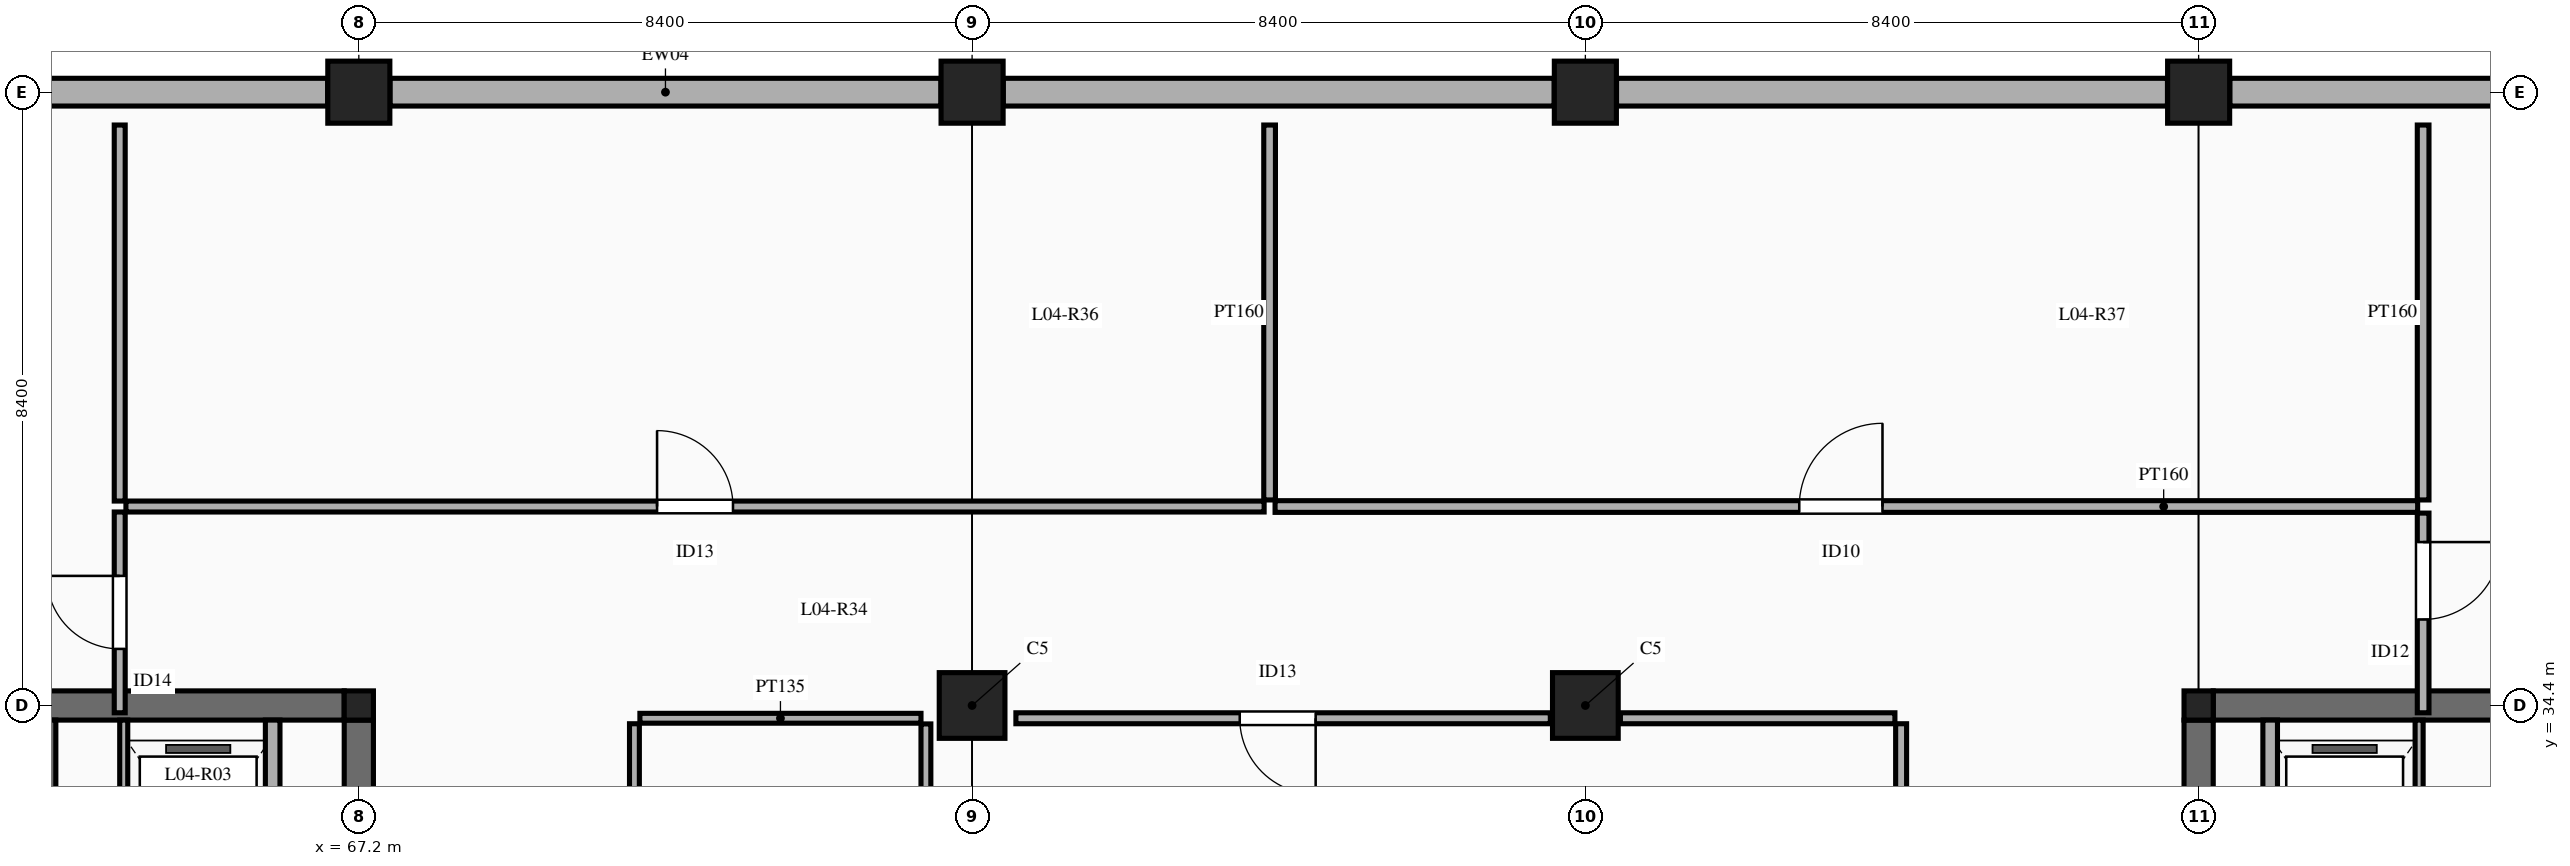
"""IFC4 building model, lengths in metres.
Left out: names, types, materials, properties, quantities, classifications, styles, units other than length and angle.
Written with IfcOpenShell. Run it as: python <this file> out.ifc"""

import sys

from ifc_helpers import new_model, si_unit, direction, frame, frame_2d, origin, origin_2d, place, context, subcontext, project, spatial, rectangle, extrude, element, fill, save


model = new_model("IFC4")
c1 = context("Model", 3, precision=1e-05, world=origin(), true_north=direction((0.0, 1.0)))
c2 = subcontext(c1, "Body", "Model", "MODEL_VIEW")
j1 = project(units=[si_unit("LENGTHUNIT", "METRE"), si_unit("PLANEANGLEUNIT", "RADIAN")], contexts=[c1])
p1 = place(None, origin())
s1 = spatial("IfcSite", under=j1, at=p1, CompositionType="ELEMENT")
p2 = place(p1, origin())
s2 = spatial("IfcBuilding", under=s1, at=p2, CompositionType="ELEMENT")
p3 = place(p2, frame((0.0, 0.0, 19.5)))
s3 = spatial("IfcBuildingStorey", under=s2, at=p3, CompositionType="ELEMENT", Elevation=19.5)
p4 = place(p3, frame((67.2, 34.4, 0.0), z_axis=(0.0, 0.0, 1.0), x_axis=(1.0, 0.0, 0.0)))
e1 = element("IfcColumn", 1, at=p4, inside=s3, PredefinedType="COLUMN", context=c2, shape_type="SweptSolid", body=[
    extrude(rectangle(XDim=0.4, YDim=0.4, at=origin_2d()), origin(), (0.0, 0.0, 1.0), 4.5),
])
p5 = place(p3, frame((67.2, 42.8, 0.0), z_axis=(0.0, 0.0, 1.0), x_axis=(1.0, 0.0, 0.0)))
e2 = element("IfcColumn", 2, at=p5, inside=s3, PredefinedType="COLUMN", context=c2, shape_type="SweptSolid", body=[
    extrude(rectangle(XDim=0.85, YDim=0.85, at=origin_2d()), origin(), (0.0, 0.0, 1.0), 4.5),
])
p6 = place(p3, frame((75.6, 34.4, 0.0), z_axis=(0.0, 0.0, 1.0), x_axis=(1.0, 0.0, 0.0)))
e3 = element("IfcColumn", 3, at=p6, inside=s3, PredefinedType="COLUMN", context=c2, shape_type="SweptSolid", body=[
    extrude(rectangle(XDim=0.9, YDim=0.9, at=origin_2d()), origin(), (0.0, 0.0, 1.0), 4.5),
])
p7 = place(p3, frame((75.6, 42.8, 0.0), z_axis=(0.0, 0.0, 1.0), x_axis=(1.0, 0.0, 0.0)))
e4 = element("IfcColumn", 4, at=p7, inside=s3, PredefinedType="COLUMN", context=c2, shape_type="SweptSolid", body=[
    extrude(rectangle(XDim=0.85, YDim=0.85, at=origin_2d()), origin(), (0.0, 0.0, 1.0), 4.5),
])
p8 = place(p3, frame((84.0, 34.4, 0.0), z_axis=(0.0, 0.0, 1.0), x_axis=(1.0, 0.0, 0.0)))
e5 = element("IfcColumn", 5, at=p8, inside=s3, PredefinedType="COLUMN", context=c2, shape_type="SweptSolid", body=[
    extrude(rectangle(XDim=0.9, YDim=0.9, at=origin_2d()), origin(), (0.0, 0.0, 1.0), 4.5),
])
p9 = place(p3, frame((84.0, 42.8, 0.0), z_axis=(0.0, 0.0, 1.0), x_axis=(1.0, 0.0, 0.0)))
e6 = element("IfcColumn", 6, at=p9, inside=s3, PredefinedType="COLUMN", context=c2, shape_type="SweptSolid", body=[
    extrude(rectangle(XDim=0.85, YDim=0.85, at=origin_2d()), origin(), (0.0, 0.0, 1.0), 4.5),
])
p10 = place(p3, frame((92.4, 34.4, 0.0), z_axis=(0.0, 0.0, 1.0), x_axis=(1.0, 0.0, 0.0)))
e7 = element("IfcColumn", 7, at=p10, inside=s3, PredefinedType="COLUMN", context=c2, shape_type="SweptSolid", body=[
    extrude(rectangle(XDim=0.4, YDim=0.4, at=origin_2d()), origin(), (0.0, 0.0, 1.0), 4.5),
])
p11 = place(p3, frame((92.4, 42.8, 0.0), z_axis=(0.0, 0.0, 1.0), x_axis=(1.0, 0.0, 0.0)))
e8 = element("IfcColumn", 8, at=p11, inside=s3, PredefinedType="COLUMN", context=c2, shape_type="SweptSolid", body=[
    extrude(rectangle(XDim=0.85, YDim=0.85, at=origin_2d()), origin(), (0.0, 0.0, 1.0), 4.5),
])
for number, where, z_axis, x_axis in (
    (9, (67.2, 26.2, 0.0), (0.0, 0.0, 1.0), (0.0, 1.0, 0.0)),
    (10, (59.0, 34.4, 0.0), (0.0, 0.0, 1.0), (1.0, 0.0, 0.0)),
    (11, (92.4, 26.2, 0.0), (0.0, 0.0, 1.0), (0.0, 1.0, 0.0)),
    (12, (92.6, 34.4, 0.0), (0.0, 0.0, 1.0), (1.0, 0.0, 0.0)),
):
    element("IfcWall", number, at=place(p3, frame(where, z_axis=z_axis, x_axis=x_axis)), inside=s3, PredefinedType="SHEAR", context=c2, shape_type="SweptSolid", body=[
        extrude(rectangle(XDim=8.0, YDim=0.4, at=frame_2d((4.0, 0.0))), origin(), (0.0, 0.0, 1.0), 4.5),
    ])
p12 = place(p3, frame((59.227, 42.8, 0.0), z_axis=(0.0, 0.0, 1.0), x_axis=(1.0, 0.0, 0.0)))
e13 = element("IfcWall", 13, at=p12, inside=s3, PredefinedType="SOLIDWALL", context=c2, shape_type="SweptSolid", body=[
    extrude(rectangle(XDim=7.546, YDim=0.38, at=frame_2d((3.773, 0.0))), origin(), (0.0, 0.0, 1.0), 3.55),
])
p13 = place(p3, frame((67.627, 42.8, 0.0), z_axis=(0.0, 0.0, 1.0), x_axis=(1.0, 0.0, 0.0)))
e14 = element("IfcWall", 14, at=p13, inside=s3, PredefinedType="SOLIDWALL", context=c2, shape_type="SweptSolid", body=[
    extrude(rectangle(XDim=7.546, YDim=0.38, at=frame_2d((3.773, 0.0))), origin(), (0.0, 0.0, 1.0), 3.55),
])
for number, where, z_axis, x_axis in (
    (15, (76.027, 42.8, 0.0), (0.0, 0.0, 1.0), (1.0, 0.0, 0.0)),
    (16, (84.427, 42.8, 0.0), (0.0, 0.0, 1.0), (1.0, 0.0, 0.0)),
):
    element("IfcWall", number, at=place(p3, frame(where, z_axis=z_axis, x_axis=x_axis)), inside=s3, PredefinedType="SOLIDWALL", context=c2, shape_type="SweptSolid", body=[
        extrude(rectangle(XDim=7.546, YDim=0.38, at=frame_2d((3.773, 0.0))), origin(), (0.0, 0.0, 1.0), 3.55),
    ])
p14 = place(p3, frame((92.827, 42.8, 0.0), z_axis=(0.0, 0.0, 1.0), x_axis=(1.0, 0.0, 0.0)))
e17 = element("IfcWall", 17, at=p14, inside=s3, PredefinedType="SOLIDWALL", context=c2, shape_type="SweptSolid", body=[
    extrude(rectangle(XDim=7.546, YDim=0.38, at=frame_2d((3.773, 0.0))), origin(), (0.0, 0.0, 1.0), 3.55),
])
p15 = place(p3, frame((62.95, 26.1, 0.0), z_axis=(0.0, 0.0, 1.0), x_axis=(0.0, 1.0, 0.0)))
e18 = element("IfcWall", 18, at=p15, inside=s3, PredefinedType="SOLIDWALL", context=c2, shape_type="SweptSolid", body=[
    extrude(rectangle(XDim=8.1, YDim=0.2, at=frame_2d((4.05, 0.0))), origin(), (0.0, 0.0, 1.0), 4.25),
])
p16 = place(p15, frame((0.45, 0.0, 0.0)))
e19 = element("IfcOpeningElement", 19, at=p16, cuts=e18, PredefinedType="OPENING", context=c2, shape_type="SweptSolid", body=[
    extrude(rectangle(XDim=1.12, YDim=2.15, at=frame_2d((0.56, 1.075))), frame((0.0, 0.11, 0.0), z_axis=(0.0, -1.0, 0.0), x_axis=(1.0, 0.0, 0.0)), (0.0, 0.0, 1.0), 0.22),
])
p17 = place(p3, frame((63.98, 31.15, 0.0), z_axis=(0.0, 0.0, 1.0), x_axis=(0.0, 1.0, 0.0)))
e20 = element("IfcWall", 20, at=p17, inside=s3, PredefinedType="PARTITIONING", context=c2, shape_type="SweptSolid", body=[
    extrude(rectangle(XDim=3.05, YDim=0.11, at=frame_2d((1.525, 0.0))), origin(), (0.0, 0.0, 1.0), 4.25),
])
p18 = place(p3, frame((66.02, 31.15, 0.0), z_axis=(0.0, 0.0, 1.0), x_axis=(0.0, 1.0, 0.0)))
e21 = element("IfcWall", 21, at=p18, inside=s3, PredefinedType="SOLIDWALL", context=c2, shape_type="SweptSolid", body=[
    extrude(rectangle(XDim=3.05, YDim=0.2, at=frame_2d((1.525, 0.0))), origin(), (0.0, 0.0, 1.0), 4.25),
])
p19 = place(p3, frame((95.42, 31.15, 0.0), z_axis=(0.0, 0.0, 1.0), x_axis=(0.0, 1.0, 0.0)))
e22 = element("IfcWall", 22, at=p19, inside=s3, PredefinedType="PARTITIONING", context=c2, shape_type="SweptSolid", body=[
    extrude(rectangle(XDim=3.05, YDim=0.11, at=frame_2d((1.525, 0.0))), origin(), (0.0, 0.0, 1.0), 4.25),
])
p20 = place(p3, frame((93.38, 31.15, 0.0), z_axis=(0.0, 0.0, 1.0), x_axis=(0.0, 1.0, 0.0)))
e23 = element("IfcWall", 23, at=p20, inside=s3, PredefinedType="SOLIDWALL", context=c2, shape_type="SweptSolid", body=[
    extrude(rectangle(XDim=3.05, YDim=0.2, at=frame_2d((1.525, 0.0))), origin(), (0.0, 0.0, 1.0), 4.25),
])
p21 = place(p3, frame((70.975, 30.25, 0.0), z_axis=(0.0, 0.0, 1.0), x_axis=(0.0, 1.0, 0.0)))
e24 = element("IfcWall", 24, at=p21, inside=s3, PredefinedType="PARTITIONING", context=c2, shape_type="SweptSolid", body=[
    extrude(rectangle(XDim=3.9, YDim=0.135, at=frame_2d((1.95, 0.0))), origin(), (0.0, 0.0, 1.0), 3.45),
])
p22 = place(p21, frame((1.46, 0.0, 0.0)))
e25 = element("IfcOpeningElement", 25, at=p22, cuts=e24, PredefinedType="OPENING", context=c2, shape_type="SweptSolid", body=[
    extrude(rectangle(XDim=0.98, YDim=2.15, at=frame_2d((0.49, 1.075))), frame((0.0, 0.077, 0.0), z_axis=(0.0, -1.0, 0.0), x_axis=(1.0, 0.0, 0.0)), (0.0, 0.0, 1.0), 0.155),
])
p23 = place(p3, frame((71.05, 34.225, 0.0), z_axis=(0.0, 0.0, 1.0), x_axis=(1.0, 0.0, 0.0)))
e26 = element("IfcWall", 26, at=p23, inside=s3, PredefinedType="PARTITIONING", context=c2, shape_type="SweptSolid", body=[
    extrude(rectangle(XDim=3.85, YDim=0.135, at=frame_2d((1.925, 0.0))), origin(), (0.0, 0.0, 1.0), 3.45),
])
p24 = place(p3, frame((88.325, 29.45, 0.0), z_axis=(0.0, 0.0, 1.0), x_axis=(0.0, 1.0, 0.0)))
e27 = element("IfcWall", 27, at=p24, inside=s3, PredefinedType="PARTITIONING", context=c2, shape_type="SweptSolid", body=[
    extrude(rectangle(XDim=4.7, YDim=0.15, at=frame_2d((2.35, 0.0))), origin(), (0.0, 0.0, 1.0), 3.45),
])
p25 = place(p3, frame((76.2, 34.225, 0.0), z_axis=(0.0, 0.0, 1.0), x_axis=(1.0, 0.0, 0.0)))
e28 = element("IfcWall", 28, at=p25, inside=s3, PredefinedType="PARTITIONING", context=c2, shape_type="SweptSolid", body=[
    extrude(rectangle(XDim=7.32, YDim=0.15, at=frame_2d((3.66, 0.0))), origin(), (0.0, 0.0, 1.0), 3.45),
])
p26 = place(p25, frame((3.066, 0.0, 0.0)))
e29 = element("IfcOpeningElement", 29, at=p26, cuts=e28, PredefinedType="OPENING", context=c2, shape_type="SweptSolid", body=[
    extrude(rectangle(XDim=1.04, YDim=2.15, at=frame_2d((0.52, 1.075))), frame((0.0, 0.085, 0.0), z_axis=(0.0, -1.0, 0.0), x_axis=(1.0, 0.0, 0.0)), (0.0, 0.0, 1.0), 0.17),
])
p27 = place(p3, frame((84.48, 34.225, 0.0), z_axis=(0.0, 0.0, 1.0), x_axis=(1.0, 0.0, 0.0)))
e30 = element("IfcWall", 30, at=p27, inside=s3, PredefinedType="PARTITIONING", context=c2, shape_type="SweptSolid", body=[
    extrude(rectangle(XDim=3.76, YDim=0.15, at=frame_2d((1.88, 0.0))), origin(), (0.0, 0.0, 1.0), 3.45),
])
p28 = place(p3, frame((63.925, 34.3, 0.0), z_axis=(0.0, 0.0, 1.0), x_axis=(0.0, 1.0, 0.0)))
e31 = element("IfcWall", 31, at=p28, inside=s3, PredefinedType="PARTITIONING", context=c2, shape_type="SweptSolid", body=[
    extrude(rectangle(XDim=2.75, YDim=0.15, at=frame_2d((1.375, 0.0))), origin(), (0.0, 0.0, 1.0), 3.45),
])
p29 = place(p28, frame((0.875, 0.0, 0.0)))
e32 = element("IfcOpeningElement", 32, at=p29, cuts=e31, PredefinedType="OPENING", context=c2, shape_type="SweptSolid", body=[
    extrude(rectangle(XDim=1.0, YDim=2.15, at=frame_2d((0.5, 1.075))), frame((0.0, 0.085, 0.0), z_axis=(0.0, -1.0, 0.0), x_axis=(1.0, 0.0, 0.0)), (0.0, 0.0, 1.0), 0.17),
])
p30 = place(p3, frame((64.01, 37.125, 0.0), z_axis=(0.0, 0.0, 1.0), x_axis=(1.0, 0.0, 0.0)))
e33 = element("IfcWall", 33, at=p30, inside=s3, PredefinedType="PARTITIONING", context=c2, shape_type="SweptSolid", body=[
    extrude(rectangle(XDim=15.59, YDim=0.15, at=frame_2d((7.795, 0.0))), origin(), (0.0, 0.0, 1.0), 3.45),
])
p31 = place(p30, frame((7.275, 0.0, 0.0)))
e34 = element("IfcOpeningElement", 34, at=p31, cuts=e33, PredefinedType="OPENING", context=c2, shape_type="SweptSolid", body=[
    extrude(rectangle(XDim=1.04, YDim=2.15, at=frame_2d((0.52, 1.075))), frame((0.0, 0.085, 0.0), z_axis=(0.0, -1.0, 0.0), x_axis=(1.0, 0.0, 0.0)), (0.0, 0.0, 1.0), 0.17),
])
p32 = place(p3, frame((79.75, 37.125, 0.0), z_axis=(0.0, 0.0, 1.0), x_axis=(1.0, 0.0, 0.0)))
e35 = element("IfcWall", 35, at=p32, inside=s3, PredefinedType="PARTITIONING", context=c2, shape_type="SweptSolid", body=[
    extrude(rectangle(XDim=15.65, YDim=0.16, at=frame_2d((7.825, 0.0))), origin(), (0.0, 0.0, 1.0), 3.45),
])
p33 = place(p32, frame((7.18, 0.0, 0.0)))
e36 = element("IfcOpeningElement", 36, at=p33, cuts=e35, PredefinedType="OPENING", context=c2, shape_type="SweptSolid", body=[
    extrude(rectangle(XDim=1.14, YDim=2.22, at=frame_2d((0.57, 1.11))), frame((0.0, 0.09, 0.0), z_axis=(0.0, -1.0, 0.0), x_axis=(1.0, 0.0, 0.0)), (0.0, 0.0, 1.0), 0.18),
])
p34 = place(p3, frame((95.475, 34.3, 0.0), z_axis=(0.0, 0.0, 1.0), x_axis=(0.0, 1.0, 0.0)))
e37 = element("IfcWall", 37, at=p34, inside=s3, PredefinedType="PARTITIONING", context=c2, shape_type="SweptSolid", body=[
    extrude(rectangle(XDim=2.735, YDim=0.16, at=frame_2d((1.367, 0.0))), origin(), (0.0, 0.0, 1.0), 3.45),
])
p35 = place(p34, frame((1.278, 0.0, 0.0)))
e38 = element("IfcOpeningElement", 38, at=p35, cuts=e37, PredefinedType="OPENING", context=c2, shape_type="SweptSolid", body=[
    extrude(rectangle(XDim=1.06, YDim=2.18, at=frame_2d((0.53, 1.09))), frame((0.0, 0.09, 0.0), z_axis=(0.0, -1.0, 0.0), x_axis=(1.0, 0.0, 0.0)), (0.0, 0.0, 1.0), 0.18),
])
p36 = place(p3, frame((63.925, 37.2, 0.0), z_axis=(0.0, 0.0, 1.0), x_axis=(0.0, 1.0, 0.0)))
e39 = element("IfcWall", 39, at=p36, inside=s3, PredefinedType="PARTITIONING", context=c2, shape_type="SweptSolid", body=[
    extrude(rectangle(XDim=5.15, YDim=0.15, at=frame_2d((2.575, 0.0))), origin(), (0.0, 0.0, 1.0), 3.45),
])
for number, where, z_axis, x_axis in (
    (40, (79.675, 37.215, 0.0), (0.0, 0.0, 1.0), (0.0, 1.0, 0.0)),
    (41, (95.475, 37.215, 0.0), (0.0, 0.0, 1.0), (0.0, 1.0, 0.0)),
):
    element("IfcWall", number, at=place(p3, frame(where, z_axis=z_axis, x_axis=x_axis)), inside=s3, PredefinedType="PARTITIONING", context=c2, shape_type="SweptSolid", body=[
        extrude(rectangle(XDim=5.135, YDim=0.16, at=frame_2d((2.567, 0.0))), origin(), (0.0, 0.0, 1.0), 3.45),
    ])
p37 = place(p3, frame((74.968, 30.252, 0.0), z_axis=(0.0, 0.0, 1.0), x_axis=(0.0, 1.0, 0.0)))
e42 = element("IfcWall", 42, at=p37, inside=s3, PredefinedType="PARTITIONING", context=c2, shape_type="SweptSolid", body=[
    extrude(rectangle(XDim=3.895, YDim=0.135, at=frame_2d((1.948, 0.0))), origin(), (0.0, 0.0, 1.0), 3.45),
])
p38 = place(p26, frame((1.04, 0.0, 0.0), z_axis=(0.0, 0.0, 1.0), x_axis=(-1.0, 0.0, 0.0)))
e43 = element("IfcDoor", 43, at=p38, inside=s3, OperationType="SINGLE_SWING_LEFT", PredefinedType="DOOR", context=c2, shape_type="SweptSolid", body=[
    extrude(rectangle(XDim=1.04, YDim=2.15, at=frame_2d((0.52, 1.075))), frame((0.0, 0.025, 0.0), z_axis=(0.0, -1.0, 0.0), x_axis=(1.0, 0.0, 0.0)), (0.0, 0.0, 1.0), 0.05),
])
fill(e29, e43)
p39 = place(p29, origin())
e44 = element("IfcDoor", 44, at=p39, inside=s3, OperationType="SINGLE_SWING_RIGHT", PredefinedType="DOOR", context=c2, shape_type="SweptSolid", body=[
    extrude(rectangle(XDim=1.0, YDim=2.15, at=frame_2d((0.5, 1.075))), frame((0.0, 0.025, 0.0), z_axis=(0.0, -1.0, 0.0), x_axis=(1.0, 0.0, 0.0)), (0.0, 0.0, 1.0), 0.05),
])
fill(e32, e44)
p40 = place(p31, origin())
e45 = element("IfcDoor", 45, at=p40, inside=s3, OperationType="SINGLE_SWING_LEFT", PredefinedType="DOOR", context=c2, shape_type="SweptSolid", body=[
    extrude(rectangle(XDim=1.04, YDim=2.15, at=frame_2d((0.52, 1.075))), frame((0.0, 0.025, 0.0), z_axis=(0.0, -1.0, 0.0), x_axis=(1.0, 0.0, 0.0)), (0.0, 0.0, 1.0), 0.05),
])
fill(e34, e45)
p41 = place(p33, origin())
e46 = element("IfcDoor", 46, at=p41, inside=s3, OperationType="SINGLE_SWING_RIGHT", PredefinedType="DOOR", context=c2, shape_type="SweptSolid", body=[
    extrude(rectangle(XDim=1.14, YDim=2.22, at=frame_2d((0.57, 1.11))), frame((0.0, 0.025, 0.0), z_axis=(0.0, -1.0, 0.0), x_axis=(1.0, 0.0, 0.0)), (0.0, 0.0, 1.0), 0.05),
])
fill(e36, e46)
p42 = place(p35, frame((1.06, 0.0, 0.0), z_axis=(0.0, 0.0, 1.0), x_axis=(-1.0, 0.0, 0.0)))
e47 = element("IfcDoor", 47, at=p42, inside=s3, OperationType="SINGLE_SWING_LEFT", PredefinedType="DOOR", context=c2, shape_type="SweptSolid", body=[
    extrude(rectangle(XDim=1.06, YDim=2.18, at=frame_2d((0.53, 1.09))), frame((0.0, 0.025, 0.0), z_axis=(0.0, -1.0, 0.0), x_axis=(1.0, 0.0, 0.0)), (0.0, 0.0, 1.0), 0.05),
])
fill(e38, e47)
save(model, sys.argv[1])
